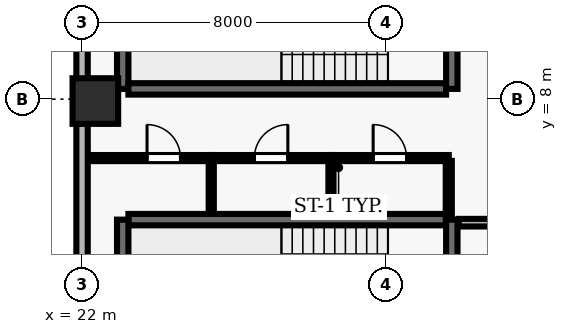
"""IFC4 building model, lengths in metres.
Left out: names, types, materials, properties, quantities, classifications, styles, units other than length and angle.
Written with IfcOpenShell. Run it as: python <this file> out.ifc"""

import sys

from ifc_helpers import new_model, si_unit, direction, frame, frame_2d, origin, origin_2d, place, context, subcontext, project, spatial, rectangle, extrude, element, fill, save


model = new_model("IFC4")
c1 = context("Model", 3, precision=1e-05, world=origin(), true_north=direction((0.0, 1.0)))
c2 = subcontext(c1, "Body", "Model", "MODEL_VIEW")
j1 = project(units=[si_unit("LENGTHUNIT", "METRE"), si_unit("PLANEANGLEUNIT", "RADIAN")], contexts=[c1])
p1 = place(None, origin())
s1 = spatial("IfcSite", under=j1, at=p1, CompositionType="ELEMENT")
p2 = place(p1, origin())
s2 = spatial("IfcBuilding", under=s1, at=p2, CompositionType="ELEMENT")
p3 = place(p2, frame((0.0, 0.0, 130.7)))
s3 = spatial("IfcBuildingStorey", under=s2, at=p3, CompositionType="ELEMENT", Elevation=130.7)
p4 = place(p3, frame((22.35, 7.95, 0.0), z_axis=(0.0, 0.0, 1.0), x_axis=(1.0, 0.0, 0.0)))
e1 = element("IfcColumn", 1, at=p4, inside=s3, PredefinedType="COLUMN", context=c2, shape_type="SweptSolid", body=[
    extrude(rectangle(XDim=1.2, YDim=1.2, at=origin_2d()), origin(), (0.0, 0.0, 1.0), 3.9),
])
p5 = place(p3, frame((22.0, 46.1, 0.0), z_axis=(0.0, 0.0, 1.0), x_axis=(0.0, -1.0, 0.0)))
e2 = element("IfcWall", 2, at=p5, inside=s3, PredefinedType="SOLIDWALL", context=c2, shape_type="SweptSolid", body=[
    extrude(rectangle(XDim=43.6, YDim=0.3, at=frame_2d((21.8, 0.0))), origin(), (0.0, 0.0, 1.0), 3.69),
])
p6 = place(p5, frame((12.7, 0.0, 0.0)))
e3 = element("IfcOpeningElement", 3, at=p6, cuts=e2, PredefinedType="OPENING", context=c2, shape_type="SweptSolid", body=[
    extrude(rectangle(XDim=1.0, YDim=2.2, at=frame_2d((0.5, 1.1))), frame((0.0, 0.16, 0.0), z_axis=(0.0, -1.0, 0.0), x_axis=(1.0, 0.0, 0.0)), (0.0, 0.0, 1.0), 0.32),
])
p7 = place(p5, frame((1.525, 0.0, 0.9)))
e4 = element("IfcOpeningElement", 4, at=p7, cuts=e2, PredefinedType="OPENING", context=c2, shape_type="SweptSolid", body=[
    extrude(rectangle(XDim=2.4, YDim=1.8, at=frame_2d((1.2, 0.9))), frame((0.0, 0.16, 0.0), z_axis=(0.0, -1.0, 0.0), x_axis=(1.0, 0.0, 0.0)), (0.0, 0.0, 1.0), 0.32),
])
p8 = place(p5, frame((6.075, 0.0, 0.9)))
e5 = element("IfcOpeningElement", 5, at=p8, cuts=e2, PredefinedType="OPENING", context=c2, shape_type="SweptSolid", body=[
    extrude(rectangle(XDim=2.4, YDim=1.8, at=frame_2d((1.2, 0.9))), frame((0.0, 0.16, 0.0), z_axis=(0.0, -1.0, 0.0), x_axis=(1.0, 0.0, 0.0)), (0.0, 0.0, 1.0), 0.32),
])
p9 = place(p5, frame((16.975, 0.0, 0.9)))
e6 = element("IfcOpeningElement", 6, at=p9, cuts=e2, PredefinedType="OPENING", context=c2, shape_type="SweptSolid", body=[
    extrude(rectangle(XDim=2.4, YDim=1.8, at=frame_2d((1.2, 0.9))), frame((0.0, 0.16, 0.0), z_axis=(0.0, -1.0, 0.0), x_axis=(1.0, 0.0, 0.0)), (0.0, 0.0, 1.0), 0.32),
])
p10 = place(p5, frame((23.775, 0.0, 0.9)))
e7 = element("IfcOpeningElement", 7, at=p10, cuts=e2, PredefinedType="OPENING", context=c2, shape_type="SweptSolid", body=[
    extrude(rectangle(XDim=2.4, YDim=1.8, at=frame_2d((1.2, 0.9))), frame((0.0, 0.16, 0.0), z_axis=(0.0, -1.0, 0.0), x_axis=(1.0, 0.0, 0.0)), (0.0, 0.0, 1.0), 0.32),
])
p11 = place(p5, frame((27.875, 0.0, 0.9)))
e8 = element("IfcOpeningElement", 8, at=p11, cuts=e2, PredefinedType="OPENING", context=c2, shape_type="SweptSolid", body=[
    extrude(rectangle(XDim=2.4, YDim=1.8, at=frame_2d((1.2, 0.9))), frame((0.0, 0.16, 0.0), z_axis=(0.0, -1.0, 0.0), x_axis=(1.0, 0.0, 0.0)), (0.0, 0.0, 1.0), 0.32),
])
p12 = place(p5, frame((34.225, 0.0, 0.9)))
e9 = element("IfcOpeningElement", 9, at=p12, cuts=e2, PredefinedType="OPENING", context=c2, shape_type="SweptSolid", body=[
    extrude(rectangle(XDim=2.4, YDim=1.8, at=frame_2d((1.2, 0.9))), frame((0.0, 0.16, 0.0), z_axis=(0.0, -1.0, 0.0), x_axis=(1.0, 0.0, 0.0)), (0.0, 0.0, 1.0), 0.32),
])
p13 = place(p3, frame((31.58, 4.83, 0.0), z_axis=(0.0, 0.0, 1.0), x_axis=(-1.0, 0.0, 0.0)))
e10 = element("IfcWall", 10, at=p13, inside=s3, PredefinedType="SHEAR", context=c2, shape_type="SweptSolid", body=[
    extrude(rectangle(XDim=8.36, YDim=0.3, at=frame_2d((4.18, 0.0))), origin(), (0.0, 0.0, 1.0), 3.69),
])
p14 = place(p3, frame((23.07, 4.83, 0.0), z_axis=(0.0, 0.0, 1.0), x_axis=(0.0, -1.0, 0.0)))
e11 = element("IfcWall", 11, at=p14, inside=s3, PredefinedType="SHEAR", context=c2, shape_type="SweptSolid", body=[
    extrude(rectangle(XDim=3.51, YDim=0.3, at=frame_2d((1.755, 0.0))), origin(), (0.0, 0.0, 1.0), 3.69),
])
p15 = place(p3, frame((31.73, 0.96, 0.0), z_axis=(0.0, 0.0, 1.0), x_axis=(0.0, 1.0, 0.0)))
e12 = element("IfcWall", 12, at=p15, inside=s3, PredefinedType="SHEAR", context=c2, shape_type="SweptSolid", body=[
    extrude(rectangle(XDim=3.87, YDim=0.3, at=frame_2d((1.935, 0.0))), origin(), (0.0, 0.0, 1.0), 3.69),
])
p16 = place(p15, frame((1.54, 0.0, 0.0)))
e13 = element("IfcOpeningElement", 13, at=p16, cuts=e12, PredefinedType="OPENING", context=c2, shape_type="SweptSolid", body=[
    extrude(rectangle(XDim=1.15, YDim=2.15, at=frame_2d((0.575, 1.075))), frame((0.0, 0.16, 0.0), z_axis=(0.0, -1.0, 0.0), x_axis=(1.0, 0.0, 0.0)), (0.0, 0.0, 1.0), 0.32),
])
p17 = place(p3, frame((23.07, 11.78, 0.0), z_axis=(0.0, 0.0, 1.0), x_axis=(0.0, -1.0, 0.0)))
e14 = element("IfcWall", 14, at=p17, inside=s3, PredefinedType="SHEAR", context=c2, shape_type="SweptSolid", body=[
    extrude(rectangle(XDim=3.51, YDim=0.3, at=frame_2d((1.755, 0.0))), origin(), (0.0, 0.0, 1.0), 3.69),
])
p18 = place(p3, frame((23.22, 8.27, 0.0), z_axis=(0.0, 0.0, 1.0), x_axis=(1.0, 0.0, 0.0)))
e15 = element("IfcWall", 15, at=p18, inside=s3, PredefinedType="SHEAR", context=c2, shape_type="SweptSolid", body=[
    extrude(rectangle(XDim=8.36, YDim=0.3, at=frame_2d((4.18, 0.0))), origin(), (0.0, 0.0, 1.0), 3.69),
])
p19 = place(p3, frame((31.73, 8.27, 0.0), z_axis=(0.0, 0.0, 1.0), x_axis=(0.0, 1.0, 0.0)))
e16 = element("IfcWall", 16, at=p19, inside=s3, PredefinedType="SHEAR", context=c2, shape_type="SweptSolid", body=[
    extrude(rectangle(XDim=3.51, YDim=0.3, at=frame_2d((1.755, 0.0))), origin(), (0.0, 0.0, 1.0), 3.69),
])
p20 = place(p19, frame((1.18, 0.0, 0.0)))
e17 = element("IfcOpeningElement", 17, at=p20, cuts=e16, PredefinedType="OPENING", context=c2, shape_type="SweptSolid", body=[
    extrude(rectangle(XDim=1.15, YDim=2.15, at=frame_2d((0.575, 1.075))), frame((0.0, 0.16, 0.0), z_axis=(0.0, -1.0, 0.0), x_axis=(1.0, 0.0, 0.0)), (0.0, 0.0, 1.0), 0.32),
])
p21 = place(p3, frame((22.2, 6.45, 0.0), z_axis=(0.0, 0.0, 1.0), x_axis=(1.0, 0.0, 0.0)))
e18 = element("IfcWall", 18, at=p21, inside=s3, PredefinedType="PARTITIONING", context=c2, shape_type="SweptSolid", body=[
    extrude(rectangle(XDim=3.2, YDim=0.16, at=frame_2d((1.6, 0.0))), origin(), (0.0, 0.0, 1.0), 3.69),
])
p22 = place(p21, frame((1.51, 0.0, 0.0)))
e19 = element("IfcOpeningElement", 19, at=p22, cuts=e18, PredefinedType="OPENING", context=c2, shape_type="SweptSolid", body=[
    extrude(rectangle(XDim=0.88, YDim=2.1, at=frame_2d((0.44, 1.05))), frame((0.0, 0.09, 0.0), z_axis=(0.0, -1.0, 0.0), x_axis=(1.0, 0.0, 0.0)), (0.0, 0.0, 1.0), 0.18),
])
p23 = place(p3, frame((25.4, 6.45, 0.0), z_axis=(0.0, 0.0, 1.0), x_axis=(1.0, 0.0, 0.0)))
e20 = element("IfcWall", 20, at=p23, inside=s3, PredefinedType="PARTITIONING", context=c2, shape_type="SweptSolid", body=[
    extrude(rectangle(XDim=3.15, YDim=0.16, at=frame_2d((1.575, 0.0))), origin(), (0.0, 0.0, 1.0), 3.69),
])
p24 = place(p23, frame((1.135, 0.0, 0.0)))
e21 = element("IfcOpeningElement", 21, at=p24, cuts=e20, PredefinedType="OPENING", context=c2, shape_type="SweptSolid", body=[
    extrude(rectangle(XDim=0.88, YDim=2.1, at=frame_2d((0.44, 1.05))), frame((0.0, 0.09, 0.0), z_axis=(0.0, -1.0, 0.0), x_axis=(1.0, 0.0, 0.0)), (0.0, 0.0, 1.0), 0.18),
])
p25 = place(p3, frame((28.55, 6.45, 0.0), z_axis=(0.0, 0.0, 1.0), x_axis=(1.0, 0.0, 0.0)))
e22 = element("IfcWall", 22, at=p25, inside=s3, PredefinedType="PARTITIONING", context=c2, shape_type="SweptSolid", body=[
    extrude(rectangle(XDim=3.1, YDim=0.16, at=frame_2d((1.55, 0.0))), origin(), (0.0, 0.0, 1.0), 3.69),
])
p26 = place(p25, frame((1.11, 0.0, 0.0)))
e23 = element("IfcOpeningElement", 23, at=p26, cuts=e22, PredefinedType="OPENING", context=c2, shape_type="SweptSolid", body=[
    extrude(rectangle(XDim=0.88, YDim=2.1, at=frame_2d((0.44, 1.05))), frame((0.0, 0.09, 0.0), z_axis=(0.0, -1.0, 0.0), x_axis=(1.0, 0.0, 0.0)), (0.0, 0.0, 1.0), 0.18),
])
p27 = place(p3, frame((35.02, 4.75, 0.0), z_axis=(0.0, 0.0, 1.0), x_axis=(-1.0, 0.0, 0.0)))
e24 = element("IfcWall", 24, at=p27, inside=s3, PredefinedType="SOLIDWALL", context=c2, shape_type="SweptSolid", body=[
    extrude(rectangle(XDim=3.11, YDim=0.2, at=frame_2d((1.555, 0.0))), origin(), (0.0, 0.0, 1.0), 3.69),
])
p28 = place(p27, frame((1.03, 0.0, 0.0)))
e25 = element("IfcOpeningElement", 25, at=p28, cuts=e24, PredefinedType="OPENING", context=c2, shape_type="SweptSolid", body=[
    extrude(rectangle(XDim=1.05, YDim=2.15, at=frame_2d((0.525, 1.075))), frame((0.0, 0.11, 0.0), z_axis=(0.0, -1.0, 0.0), x_axis=(1.0, 0.0, 0.0)), (0.0, 0.0, 1.0), 0.22),
])
for number, where, z_axis, x_axis in (
    (26, (25.4, 5.01, 0.0), (0.0, 0.0, 1.0), (0.0, 1.0, 0.0)),
    (27, (28.55, 5.01, 0.0), (0.0, 0.0, 1.0), (0.0, 1.0, 0.0)),
):
    element("IfcWall", number, at=place(p3, frame(where, z_axis=z_axis, x_axis=x_axis)), inside=s3, PredefinedType="PARTITIONING", context=c2, shape_type="SweptSolid", body=[
        extrude(rectangle(XDim=1.365, YDim=0.135, at=frame_2d((0.683, 0.0))), origin(), (0.0, 0.0, 1.0), 3.69),
    ])
p29 = place(p3, frame((31.65, 4.86, 0.0), z_axis=(0.0, 0.0, 1.0), x_axis=(0.0, 1.0, 0.0)))
e28 = element("IfcWall", 28, at=p29, inside=s3, PredefinedType="PARTITIONING", context=c2, shape_type="SweptSolid", body=[
    extrude(rectangle(XDim=1.515, YDim=0.16, at=frame_2d((0.757, 0.0))), origin(), (0.0, 0.0, 1.0), 3.69),
])
p30 = place(p22, origin())
e29 = element("IfcDoor", 29, at=p30, inside=s3, OperationType="SINGLE_SWING_LEFT", PredefinedType="DOOR", context=c2, shape_type="SweptSolid", body=[
    extrude(rectangle(XDim=0.88, YDim=2.1, at=frame_2d((0.44, 1.05))), frame((0.0, 0.025, 0.0), z_axis=(0.0, -1.0, 0.0), x_axis=(1.0, 0.0, 0.0)), (0.0, 0.0, 1.0), 0.05),
])
fill(e19, e29)
p31 = place(p24, origin())
e30 = element("IfcDoor", 30, at=p31, inside=s3, OperationType="SINGLE_SWING_RIGHT", PredefinedType="DOOR", context=c2, shape_type="SweptSolid", body=[
    extrude(rectangle(XDim=0.88, YDim=2.1, at=frame_2d((0.44, 1.05))), frame((0.0, 0.025, 0.0), z_axis=(0.0, -1.0, 0.0), x_axis=(1.0, 0.0, 0.0)), (0.0, 0.0, 1.0), 0.05),
])
fill(e21, e30)
p32 = place(p26, origin())
e31 = element("IfcDoor", 31, at=p32, inside=s3, OperationType="SINGLE_SWING_LEFT", PredefinedType="DOOR", context=c2, shape_type="SweptSolid", body=[
    extrude(rectangle(XDim=0.88, YDim=2.1, at=frame_2d((0.44, 1.05))), frame((0.0, 0.025, 0.0), z_axis=(0.0, -1.0, 0.0), x_axis=(1.0, 0.0, 0.0)), (0.0, 0.0, 1.0), 0.05),
])
fill(e23, e31)
save(model, sys.argv[1])
